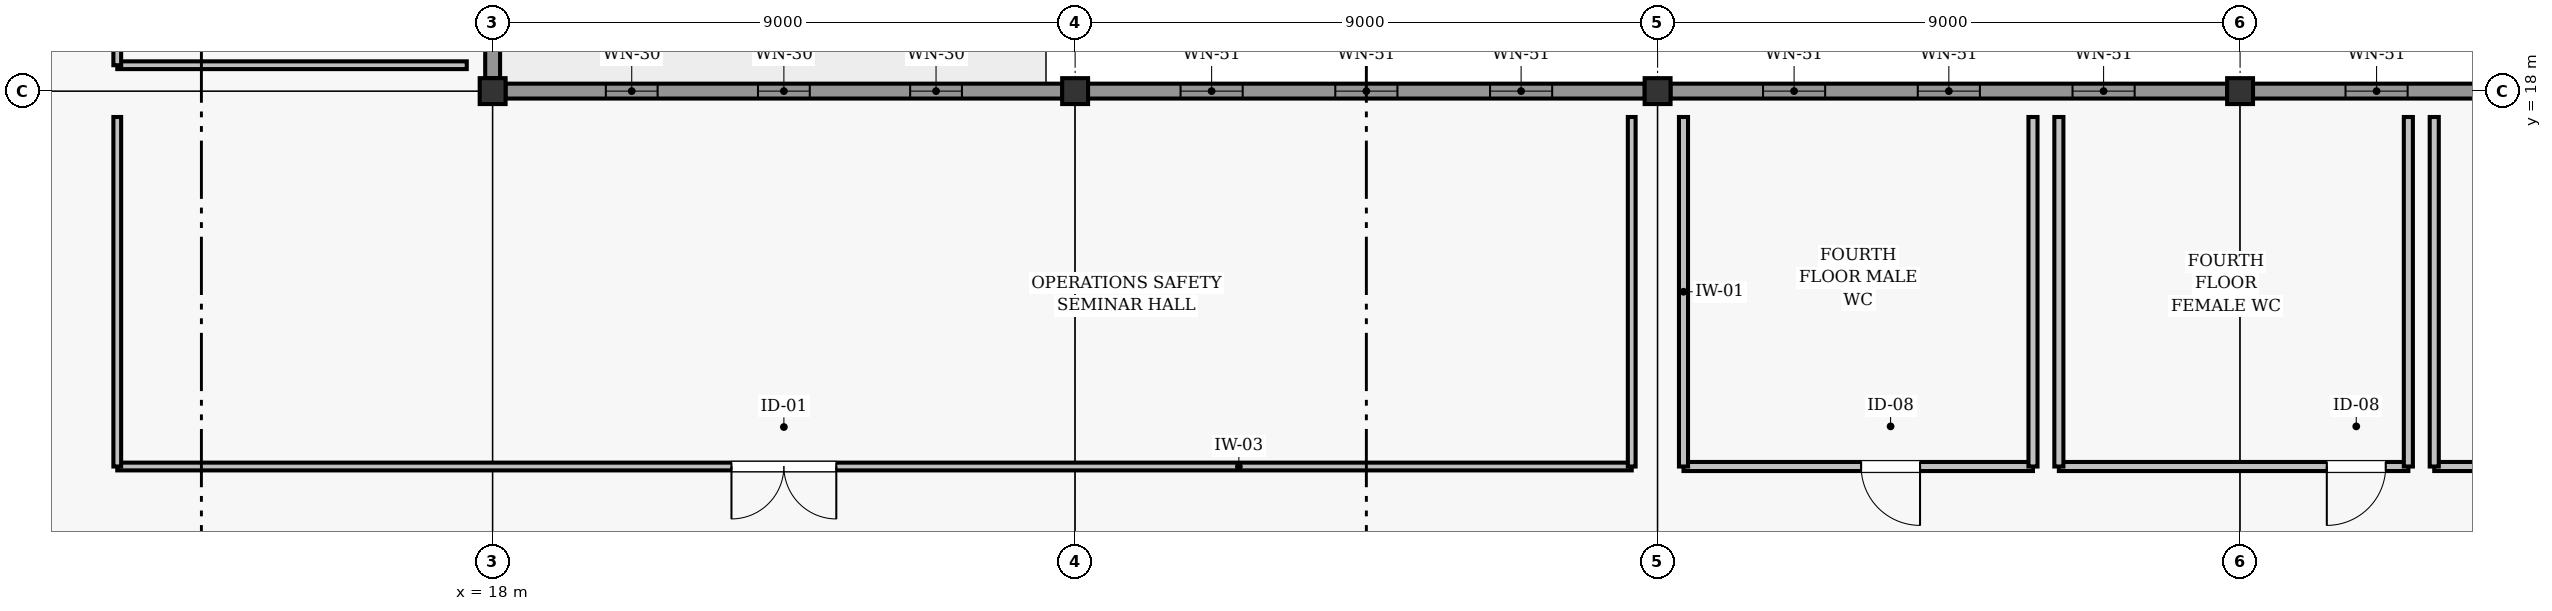
"""IFC4 building model, lengths in metres.
Left out: names, types, materials, properties, quantities, classifications, styles, units other than length and angle.
Written with IfcOpenShell. Run it as: python <this file> out.ifc"""

import sys

from ifc_helpers import new_model, si_unit, direction, frame, frame_2d, origin, origin_2d, place, context, subcontext, project, spatial, rectangle, extrude, element, fill, save


model = new_model("IFC4")
c1 = context("Model", 3, precision=1e-05, world=origin(), true_north=direction((0.0, 1.0)))
c2 = subcontext(c1, "Body", "Model", "MODEL_VIEW")
j1 = project(units=[si_unit("LENGTHUNIT", "METRE"), si_unit("PLANEANGLEUNIT", "RADIAN")], contexts=[c1])
p1 = place(None, origin())
s1 = spatial("IfcSite", under=j1, at=p1, CompositionType="ELEMENT")
p2 = place(p1, origin())
s2 = spatial("IfcBuilding", under=s1, at=p2, CompositionType="ELEMENT")
p3 = place(p2, frame((0.0, 0.0, 15.0)))
s3 = spatial("IfcBuildingStorey", under=s2, at=p3, CompositionType="ELEMENT", Elevation=15.0)
for number, where, z_axis, x_axis in (
    (1, (18.0, 18.0, 0.0), (0.0, 0.0, 1.0), (1.0, 0.0, 0.0)),
    (2, (27.0, 18.0, 0.0), (0.0, 0.0, 1.0), (1.0, 0.0, 0.0)),
    (3, (36.0, 18.0, 0.0), (0.0, 0.0, 1.0), (1.0, 0.0, 0.0)),
    (4, (45.0, 18.0, 0.0), (0.0, 0.0, 1.0), (1.0, 0.0, 0.0)),
):
    element("IfcColumn", number, at=place(p3, frame(where, z_axis=z_axis, x_axis=x_axis)), inside=s3, PredefinedType="COLUMN", context=c2, shape_type="SweptSolid", body=[
        extrude(rectangle(XDim=0.4, YDim=0.4, at=origin_2d()), origin(), (0.0, 0.0, 1.0), 3.0),
    ])
p4 = place(p3, frame((18.198, 18.0, 0.0), z_axis=(0.0, 0.0, 1.0), x_axis=(1.0, 0.0, 0.0)))
e5 = element("IfcWall", 5, at=p4, inside=s3, PredefinedType="SOLIDWALL", context=c2, shape_type="SweptSolid", body=[
    extrude(rectangle(XDim=8.604, YDim=0.23, at=frame_2d((4.302, 0.0))), origin(), (0.0, 0.0, 1.0), 2.242),
])
p5 = place(p4, frame((1.551, 0.0, 1.16)))
e6 = element("IfcOpeningElement", 6, at=p5, cuts=e5, PredefinedType="OPENING", context=c2, shape_type="SweptSolid", body=[
    extrude(rectangle(XDim=0.8, YDim=0.9, at=frame_2d((0.4, 0.45))), frame((0.0, 0.125, 0.0), z_axis=(0.0, -1.0, 0.0), x_axis=(1.0, 0.0, 0.0)), (0.0, 0.0, 1.0), 0.25),
])
p6 = place(p4, frame((3.902, 0.0, 1.16)))
e7 = element("IfcOpeningElement", 7, at=p6, cuts=e5, PredefinedType="OPENING", context=c2, shape_type="SweptSolid", body=[
    extrude(rectangle(XDim=0.8, YDim=0.9, at=frame_2d((0.4, 0.45))), frame((0.0, 0.125, 0.0), z_axis=(0.0, -1.0, 0.0), x_axis=(1.0, 0.0, 0.0)), (0.0, 0.0, 1.0), 0.25),
])
p7 = place(p4, frame((6.253, 0.0, 1.16)))
e8 = element("IfcOpeningElement", 8, at=p7, cuts=e5, PredefinedType="OPENING", context=c2, shape_type="SweptSolid", body=[
    extrude(rectangle(XDim=0.8, YDim=0.9, at=frame_2d((0.4, 0.45))), frame((0.0, 0.125, 0.0), z_axis=(0.0, -1.0, 0.0), x_axis=(1.0, 0.0, 0.0)), (0.0, 0.0, 1.0), 0.25),
])
p8 = place(p3, frame((27.198, 18.0, 0.0), z_axis=(0.0, 0.0, 1.0), x_axis=(1.0, 0.0, 0.0)))
e9 = element("IfcWall", 9, at=p8, inside=s3, PredefinedType="SOLIDWALL", context=c2, shape_type="SweptSolid", body=[
    extrude(rectangle(XDim=8.604, YDim=0.23, at=frame_2d((4.302, 0.0))), origin(), (0.0, 0.0, 1.0), 2.242),
])
p9 = place(p8, frame((1.431, 0.0, 0.8)))
e10 = element("IfcOpeningElement", 10, at=p9, cuts=e9, PredefinedType="OPENING", context=c2, shape_type="SweptSolid", body=[
    extrude(rectangle(XDim=0.96, YDim=1.04, at=frame_2d((0.48, 0.52))), frame((0.0, 0.125, 0.0), z_axis=(0.0, -1.0, 0.0), x_axis=(1.0, 0.0, 0.0)), (0.0, 0.0, 1.0), 0.25),
])
p10 = place(p8, frame((3.822, 0.0, 0.8)))
e11 = element("IfcOpeningElement", 11, at=p10, cuts=e9, PredefinedType="OPENING", context=c2, shape_type="SweptSolid", body=[
    extrude(rectangle(XDim=0.96, YDim=1.04, at=frame_2d((0.48, 0.52))), frame((0.0, 0.125, 0.0), z_axis=(0.0, -1.0, 0.0), x_axis=(1.0, 0.0, 0.0)), (0.0, 0.0, 1.0), 0.25),
])
p11 = place(p8, frame((6.213, 0.0, 0.8)))
e12 = element("IfcOpeningElement", 12, at=p11, cuts=e9, PredefinedType="OPENING", context=c2, shape_type="SweptSolid", body=[
    extrude(rectangle(XDim=0.96, YDim=1.04, at=frame_2d((0.48, 0.52))), frame((0.0, 0.125, 0.0), z_axis=(0.0, -1.0, 0.0), x_axis=(1.0, 0.0, 0.0)), (0.0, 0.0, 1.0), 0.25),
])
p12 = place(p3, frame((36.198, 18.0, 0.0), z_axis=(0.0, 0.0, 1.0), x_axis=(1.0, 0.0, 0.0)))
e13 = element("IfcWall", 13, at=p12, inside=s3, PredefinedType="SOLIDWALL", context=c2, shape_type="SweptSolid", body=[
    extrude(rectangle(XDim=8.604, YDim=0.23, at=frame_2d((4.302, 0.0))), origin(), (0.0, 0.0, 1.0), 2.242),
])
p13 = place(p12, frame((1.431, 0.0, 0.8)))
e14 = element("IfcOpeningElement", 14, at=p13, cuts=e13, PredefinedType="OPENING", context=c2, shape_type="SweptSolid", body=[
    extrude(rectangle(XDim=0.96, YDim=1.04, at=frame_2d((0.48, 0.52))), frame((0.0, 0.125, 0.0), z_axis=(0.0, -1.0, 0.0), x_axis=(1.0, 0.0, 0.0)), (0.0, 0.0, 1.0), 0.25),
])
p14 = place(p12, frame((3.822, 0.0, 0.8)))
e15 = element("IfcOpeningElement", 15, at=p14, cuts=e13, PredefinedType="OPENING", context=c2, shape_type="SweptSolid", body=[
    extrude(rectangle(XDim=0.96, YDim=1.04, at=frame_2d((0.48, 0.52))), frame((0.0, 0.125, 0.0), z_axis=(0.0, -1.0, 0.0), x_axis=(1.0, 0.0, 0.0)), (0.0, 0.0, 1.0), 0.25),
])
p15 = place(p12, frame((6.213, 0.0, 0.8)))
e16 = element("IfcOpeningElement", 16, at=p15, cuts=e13, PredefinedType="OPENING", context=c2, shape_type="SweptSolid", body=[
    extrude(rectangle(XDim=0.96, YDim=1.04, at=frame_2d((0.48, 0.52))), frame((0.0, 0.125, 0.0), z_axis=(0.0, -1.0, 0.0), x_axis=(1.0, 0.0, 0.0)), (0.0, 0.0, 1.0), 0.25),
])
p16 = place(p3, frame((45.198, 18.0, 0.0), z_axis=(0.0, 0.0, 1.0), x_axis=(1.0, 0.0, 0.0)))
e17 = element("IfcWall", 17, at=p16, inside=s3, PredefinedType="SOLIDWALL", context=c2, shape_type="SweptSolid", body=[
    extrude(rectangle(XDim=8.604, YDim=0.23, at=frame_2d((4.302, 0.0))), origin(), (0.0, 0.0, 1.0), 2.242),
])
p17 = place(p16, frame((1.431, 0.0, 0.8)))
e18 = element("IfcOpeningElement", 18, at=p17, cuts=e17, PredefinedType="OPENING", context=c2, shape_type="SweptSolid", body=[
    extrude(rectangle(XDim=0.96, YDim=1.04, at=frame_2d((0.48, 0.52))), frame((0.0, 0.125, 0.0), z_axis=(0.0, -1.0, 0.0), x_axis=(1.0, 0.0, 0.0)), (0.0, 0.0, 1.0), 0.25),
])
p18 = place(p16, frame((3.822, 0.0, 0.8)))
e19 = element("IfcOpeningElement", 19, at=p18, cuts=e17, PredefinedType="OPENING", context=c2, shape_type="SweptSolid", body=[
    extrude(rectangle(XDim=0.96, YDim=1.04, at=frame_2d((0.48, 0.52))), frame((0.0, 0.125, 0.0), z_axis=(0.0, -1.0, 0.0), x_axis=(1.0, 0.0, 0.0)), (0.0, 0.0, 1.0), 0.25),
])
p19 = place(p16, frame((6.213, 0.0, 0.8)))
e20 = element("IfcOpeningElement", 20, at=p19, cuts=e17, PredefinedType="OPENING", context=c2, shape_type="SweptSolid", body=[
    extrude(rectangle(XDim=0.96, YDim=1.04, at=frame_2d((0.48, 0.52))), frame((0.0, 0.125, 0.0), z_axis=(0.0, -1.0, 0.0), x_axis=(1.0, 0.0, 0.0)), (0.0, 0.0, 1.0), 0.25),
])
p20 = place(p3, frame((18.0, 18.198, 0.0), z_axis=(0.0, 0.0, 1.0), x_axis=(0.0, 1.0, 0.0)))
e21 = element("IfcWall", 21, at=p20, inside=s3, PredefinedType="SOLIDWALL", context=c2, shape_type="SweptSolid", body=[
    extrude(rectangle(XDim=8.604, YDim=0.23, at=frame_2d((4.302, 0.0))), origin(), (0.0, 0.0, 1.0), 2.242),
])
p21 = place(p20, frame((1.948, 0.0, 0.54)))
e22 = element("IfcOpeningElement", 22, at=p21, cuts=e21, PredefinedType="OPENING", context=c2, shape_type="SweptSolid", body=[
    extrude(rectangle(XDim=1.38, YDim=1.52, at=frame_2d((0.69, 0.76))), frame((0.0, 0.125, 0.0), z_axis=(0.0, -1.0, 0.0), x_axis=(1.0, 0.0, 0.0)), (0.0, 0.0, 1.0), 0.25),
])
p22 = place(p20, frame((5.276, 0.0, 0.54)))
e23 = element("IfcOpeningElement", 23, at=p22, cuts=e21, PredefinedType="OPENING", context=c2, shape_type="SweptSolid", body=[
    extrude(rectangle(XDim=1.38, YDim=1.52, at=frame_2d((0.69, 0.76))), frame((0.0, 0.125, 0.0), z_axis=(0.0, -1.0, 0.0), x_axis=(1.0, 0.0, 0.0)), (0.0, 0.0, 1.0), 0.25),
])
p23 = place(p3, frame((12.2, 12.2, 0.0), z_axis=(0.0, 0.0, 1.0), x_axis=(1.0, 0.0, 0.0)))
e24 = element("IfcWall", 24, at=p23, inside=s3, PredefinedType="PARTITIONING", context=c2, shape_type="SweptSolid", body=[
    extrude(rectangle(XDim=23.4, YDim=0.12, at=frame_2d((11.7, 0.0))), origin(), (0.0, 0.0, 1.0), 2.245),
])
p24 = place(p23, frame((9.49, 0.0, 0.0)))
e25 = element("IfcOpeningElement", 25, at=p24, cuts=e24, PredefinedType="OPENING", context=c2, shape_type="SweptSolid", body=[
    extrude(rectangle(XDim=1.62, YDim=2.14, at=frame_2d((0.81, 1.07))), frame((0.0, 0.07, 0.0), z_axis=(0.0, -1.0, 0.0), x_axis=(1.0, 0.0, 0.0)), (0.0, 0.0, 1.0), 0.14),
])
for number, where, z_axis, x_axis in (
    (26, (12.2, 12.2, 0.0), (0.0, 0.0, 1.0), (0.0, 1.0, 0.0)),
    (27, (35.6, 12.2, 0.0), (0.0, 0.0, 1.0), (0.0, 1.0, 0.0)),
):
    element("IfcWall", number, at=place(p3, frame(where, z_axis=z_axis, x_axis=x_axis)), inside=s3, PredefinedType="PARTITIONING", context=c2, shape_type="SweptSolid", body=[
        extrude(rectangle(XDim=5.4, YDim=0.12, at=frame_2d((2.7, 0.0))), origin(), (0.0, 0.0, 1.0), 2.79),
    ])
p25 = place(p3, frame((36.4, 12.2, 0.0), z_axis=(0.0, 0.0, 1.0), x_axis=(1.0, 0.0, 0.0)))
e28 = element("IfcWall", 28, at=p25, inside=s3, PredefinedType="PARTITIONING", context=c2, shape_type="SweptSolid", body=[
    extrude(rectangle(XDim=5.4, YDim=0.14, at=frame_2d((2.7, 0.0))), origin(), (0.0, 0.0, 1.0), 2.79),
])
p26 = place(p25, frame((2.745, 0.0, 0.0)))
e29 = element("IfcOpeningElement", 29, at=p26, cuts=e28, PredefinedType="OPENING", context=c2, shape_type="SweptSolid", body=[
    extrude(rectangle(XDim=0.91, YDim=2.04, at=frame_2d((0.455, 1.02))), frame((0.0, 0.08, 0.0), z_axis=(0.0, -1.0, 0.0), x_axis=(1.0, 0.0, 0.0)), (0.0, 0.0, 1.0), 0.16),
])
for number, where, z_axis, x_axis in (
    (30, (36.4, 12.2, 0.0), (0.0, 0.0, 1.0), (0.0, 1.0, 0.0)),
    (31, (41.8, 12.2, 0.0), (0.0, 0.0, 1.0), (0.0, 1.0, 0.0)),
):
    element("IfcWall", number, at=place(p3, frame(where, z_axis=z_axis, x_axis=x_axis)), inside=s3, PredefinedType="PARTITIONING", context=c2, shape_type="SweptSolid", body=[
        extrude(rectangle(XDim=5.4, YDim=0.14, at=frame_2d((2.7, 0.0))), origin(), (0.0, 0.0, 1.0), 2.79),
    ])
p27 = place(p3, frame((42.2, 12.2, 0.0), z_axis=(0.0, 0.0, 1.0), x_axis=(1.0, 0.0, 0.0)))
e32 = element("IfcWall", 32, at=p27, inside=s3, PredefinedType="PARTITIONING", context=c2, shape_type="SweptSolid", body=[
    extrude(rectangle(XDim=5.4, YDim=0.14, at=frame_2d((2.7, 0.0))), origin(), (0.0, 0.0, 1.0), 2.245),
])
p28 = place(p27, frame((4.14, 0.0, 0.0)))
e33 = element("IfcOpeningElement", 33, at=p28, cuts=e32, PredefinedType="OPENING", context=c2, shape_type="SweptSolid", body=[
    extrude(rectangle(XDim=0.91, YDim=2.04, at=frame_2d((0.455, 1.02))), frame((0.0, 0.08, 0.0), z_axis=(0.0, -1.0, 0.0), x_axis=(1.0, 0.0, 0.0)), (0.0, 0.0, 1.0), 0.16),
])
for number, where, z_axis, x_axis in (
    (34, (42.2, 12.2, 0.0), (0.0, 0.0, 1.0), (0.0, 1.0, 0.0)),
    (35, (47.6, 12.2, 0.0), (0.0, 0.0, 1.0), (0.0, 1.0, 0.0)),
):
    element("IfcWall", number, at=place(p3, frame(where, z_axis=z_axis, x_axis=x_axis)), inside=s3, PredefinedType="PARTITIONING", context=c2, shape_type="SweptSolid", body=[
        extrude(rectangle(XDim=5.4, YDim=0.14, at=frame_2d((2.7, 0.0))), origin(), (0.0, 0.0, 1.0), 2.79),
    ])
p29 = place(p3, frame((48.0, 12.2, 0.0), z_axis=(0.0, 0.0, 1.0), x_axis=(1.0, 0.0, 0.0)))
e36 = element("IfcWall", 36, at=p29, inside=s3, PredefinedType="PARTITIONING", context=c2, shape_type="SweptSolid", body=[
    extrude(rectangle(XDim=5.6, YDim=0.14, at=frame_2d((2.8, 0.0))), origin(), (0.0, 0.0, 1.0), 2.79),
])
p30 = place(p29, frame((2.345, 0.0, 0.0)))
e37 = element("IfcOpeningElement", 37, at=p30, cuts=e36, PredefinedType="OPENING", context=c2, shape_type="SweptSolid", body=[
    extrude(rectangle(XDim=0.91, YDim=2.04, at=frame_2d((0.455, 1.02))), frame((0.0, 0.08, 0.0), z_axis=(0.0, -1.0, 0.0), x_axis=(1.0, 0.0, 0.0)), (0.0, 0.0, 1.0), 0.16),
])
p31 = place(p3, frame((48.0, 12.2, 0.0), z_axis=(0.0, 0.0, 1.0), x_axis=(0.0, 1.0, 0.0)))
e38 = element("IfcWall", 38, at=p31, inside=s3, PredefinedType="PARTITIONING", context=c2, shape_type="SweptSolid", body=[
    extrude(rectangle(XDim=5.4, YDim=0.14, at=frame_2d((2.7, 0.0))), origin(), (0.0, 0.0, 1.0), 2.79),
])
p32 = place(p3, frame((12.2, 18.4, 0.0), z_axis=(0.0, 0.0, 1.0), x_axis=(1.0, 0.0, 0.0)))
e39 = element("IfcWall", 39, at=p32, inside=s3, PredefinedType="PARTITIONING", context=c2, shape_type="SweptSolid", body=[
    extrude(rectangle(XDim=5.4, YDim=0.12, at=frame_2d((2.7, 0.0))), origin(), (0.0, 0.0, 1.0), 2.79),
])
p33 = place(p3, frame((12.2, 18.4, 0.0), z_axis=(0.0, 0.0, 1.0), x_axis=(0.0, 1.0, 0.0)))
e40 = element("IfcWall", 40, at=p33, inside=s3, PredefinedType="PARTITIONING", context=c2, shape_type="SweptSolid", body=[
    extrude(rectangle(XDim=8.2, YDim=0.12, at=frame_2d((4.1, 0.0))), origin(), (0.0, 0.0, 1.0), 2.79),
])
p34 = place(p33, frame((3.63, 0.0, 0.0)))
e41 = element("IfcOpeningElement", 41, at=p34, cuts=e40, PredefinedType="OPENING", context=c2, shape_type="SweptSolid", body=[
    extrude(rectangle(XDim=0.94, YDim=2.06, at=frame_2d((0.47, 1.03))), frame((0.0, 0.07, 0.0), z_axis=(0.0, -1.0, 0.0), x_axis=(1.0, 0.0, 0.0)), (0.0, 0.0, 1.0), 0.14),
])
p35 = place(p5, origin())
e42 = element("IfcWindow", 42, at=p35, inside=s3, PartitioningType="SINGLE_PANEL", PredefinedType="WINDOW", context=c2, shape_type="SweptSolid", body=[
    extrude(rectangle(XDim=0.8, YDim=0.9, at=frame_2d((0.4, 0.45))), frame((0.0, 0.03, 0.0), z_axis=(0.0, -1.0, 0.0), x_axis=(1.0, 0.0, 0.0)), (0.0, 0.0, 1.0), 0.06),
])
fill(e6, e42)
p36 = place(p6, origin())
e43 = element("IfcWindow", 43, at=p36, inside=s3, PartitioningType="SINGLE_PANEL", PredefinedType="WINDOW", context=c2, shape_type="SweptSolid", body=[
    extrude(rectangle(XDim=0.8, YDim=0.9, at=frame_2d((0.4, 0.45))), frame((0.0, 0.03, 0.0), z_axis=(0.0, -1.0, 0.0), x_axis=(1.0, 0.0, 0.0)), (0.0, 0.0, 1.0), 0.06),
])
fill(e7, e43)
p37 = place(p7, origin())
e44 = element("IfcWindow", 44, at=p37, inside=s3, PartitioningType="SINGLE_PANEL", PredefinedType="WINDOW", context=c2, shape_type="SweptSolid", body=[
    extrude(rectangle(XDim=0.8, YDim=0.9, at=frame_2d((0.4, 0.45))), frame((0.0, 0.03, 0.0), z_axis=(0.0, -1.0, 0.0), x_axis=(1.0, 0.0, 0.0)), (0.0, 0.0, 1.0), 0.06),
])
fill(e8, e44)
p38 = place(p9, origin())
e45 = element("IfcWindow", 45, at=p38, inside=s3, PartitioningType="SINGLE_PANEL", PredefinedType="WINDOW", context=c2, shape_type="SweptSolid", body=[
    extrude(rectangle(XDim=0.96, YDim=1.04, at=frame_2d((0.48, 0.52))), frame((0.0, 0.03, 0.0), z_axis=(0.0, -1.0, 0.0), x_axis=(1.0, 0.0, 0.0)), (0.0, 0.0, 1.0), 0.06),
])
fill(e10, e45)
p39 = place(p10, origin())
e46 = element("IfcWindow", 46, at=p39, inside=s3, PartitioningType="SINGLE_PANEL", PredefinedType="WINDOW", context=c2, shape_type="SweptSolid", body=[
    extrude(rectangle(XDim=0.96, YDim=1.04, at=frame_2d((0.48, 0.52))), frame((0.0, 0.03, 0.0), z_axis=(0.0, -1.0, 0.0), x_axis=(1.0, 0.0, 0.0)), (0.0, 0.0, 1.0), 0.06),
])
fill(e11, e46)
p40 = place(p11, origin())
e47 = element("IfcWindow", 47, at=p40, inside=s3, PartitioningType="SINGLE_PANEL", PredefinedType="WINDOW", context=c2, shape_type="SweptSolid", body=[
    extrude(rectangle(XDim=0.96, YDim=1.04, at=frame_2d((0.48, 0.52))), frame((0.0, 0.03, 0.0), z_axis=(0.0, -1.0, 0.0), x_axis=(1.0, 0.0, 0.0)), (0.0, 0.0, 1.0), 0.06),
])
fill(e12, e47)
p41 = place(p13, origin())
e48 = element("IfcWindow", 48, at=p41, inside=s3, PartitioningType="SINGLE_PANEL", PredefinedType="WINDOW", context=c2, shape_type="SweptSolid", body=[
    extrude(rectangle(XDim=0.96, YDim=1.04, at=frame_2d((0.48, 0.52))), frame((0.0, 0.03, 0.0), z_axis=(0.0, -1.0, 0.0), x_axis=(1.0, 0.0, 0.0)), (0.0, 0.0, 1.0), 0.06),
])
fill(e14, e48)
p42 = place(p14, origin())
e49 = element("IfcWindow", 49, at=p42, inside=s3, PartitioningType="SINGLE_PANEL", PredefinedType="WINDOW", context=c2, shape_type="SweptSolid", body=[
    extrude(rectangle(XDim=0.96, YDim=1.04, at=frame_2d((0.48, 0.52))), frame((0.0, 0.03, 0.0), z_axis=(0.0, -1.0, 0.0), x_axis=(1.0, 0.0, 0.0)), (0.0, 0.0, 1.0), 0.06),
])
fill(e15, e49)
p43 = place(p15, origin())
e50 = element("IfcWindow", 50, at=p43, inside=s3, PartitioningType="SINGLE_PANEL", PredefinedType="WINDOW", context=c2, shape_type="SweptSolid", body=[
    extrude(rectangle(XDim=0.96, YDim=1.04, at=frame_2d((0.48, 0.52))), frame((0.0, 0.03, 0.0), z_axis=(0.0, -1.0, 0.0), x_axis=(1.0, 0.0, 0.0)), (0.0, 0.0, 1.0), 0.06),
])
fill(e16, e50)
p44 = place(p17, origin())
e51 = element("IfcWindow", 51, at=p44, inside=s3, PartitioningType="SINGLE_PANEL", PredefinedType="WINDOW", context=c2, shape_type="SweptSolid", body=[
    extrude(rectangle(XDim=0.96, YDim=1.04, at=frame_2d((0.48, 0.52))), frame((0.0, 0.03, 0.0), z_axis=(0.0, -1.0, 0.0), x_axis=(1.0, 0.0, 0.0)), (0.0, 0.0, 1.0), 0.06),
])
fill(e18, e51)
p45 = place(p24, frame((1.62, 0.0, 0.0), z_axis=(0.0, 0.0, 1.0), x_axis=(-1.0, 0.0, 0.0)))
e52 = element("IfcDoor", 52, at=p45, inside=s3, OperationType="DOUBLE_SWING_LEFT", PredefinedType="DOOR", context=c2, shape_type="SweptSolid", body=[
    extrude(rectangle(XDim=1.62, YDim=2.14, at=frame_2d((0.81, 1.07))), frame((0.0, 0.025, 0.0), z_axis=(0.0, -1.0, 0.0), x_axis=(1.0, 0.0, 0.0)), (0.0, 0.0, 1.0), 0.05),
])
fill(e25, e52)
p46 = place(p26, frame((0.91, 0.0, 0.0), z_axis=(0.0, 0.0, 1.0), x_axis=(-1.0, 0.0, 0.0)))
e53 = element("IfcDoor", 53, at=p46, inside=s3, OperationType="SINGLE_SWING_RIGHT", PredefinedType="DOOR", context=c2, shape_type="SweptSolid", body=[
    extrude(rectangle(XDim=0.91, YDim=2.04, at=frame_2d((0.455, 1.02))), frame((0.0, 0.025, 0.0), z_axis=(0.0, -1.0, 0.0), x_axis=(1.0, 0.0, 0.0)), (0.0, 0.0, 1.0), 0.05),
])
fill(e29, e53)
p47 = place(p28, frame((0.91, 0.0, 0.0), z_axis=(0.0, 0.0, 1.0), x_axis=(-1.0, 0.0, 0.0)))
e54 = element("IfcDoor", 54, at=p47, inside=s3, OperationType="SINGLE_SWING_LEFT", PredefinedType="DOOR", context=c2, shape_type="SweptSolid", body=[
    extrude(rectangle(XDim=0.91, YDim=2.04, at=frame_2d((0.455, 1.02))), frame((0.0, 0.025, 0.0), z_axis=(0.0, -1.0, 0.0), x_axis=(1.0, 0.0, 0.0)), (0.0, 0.0, 1.0), 0.05),
])
fill(e33, e54)
save(model, sys.argv[1])
